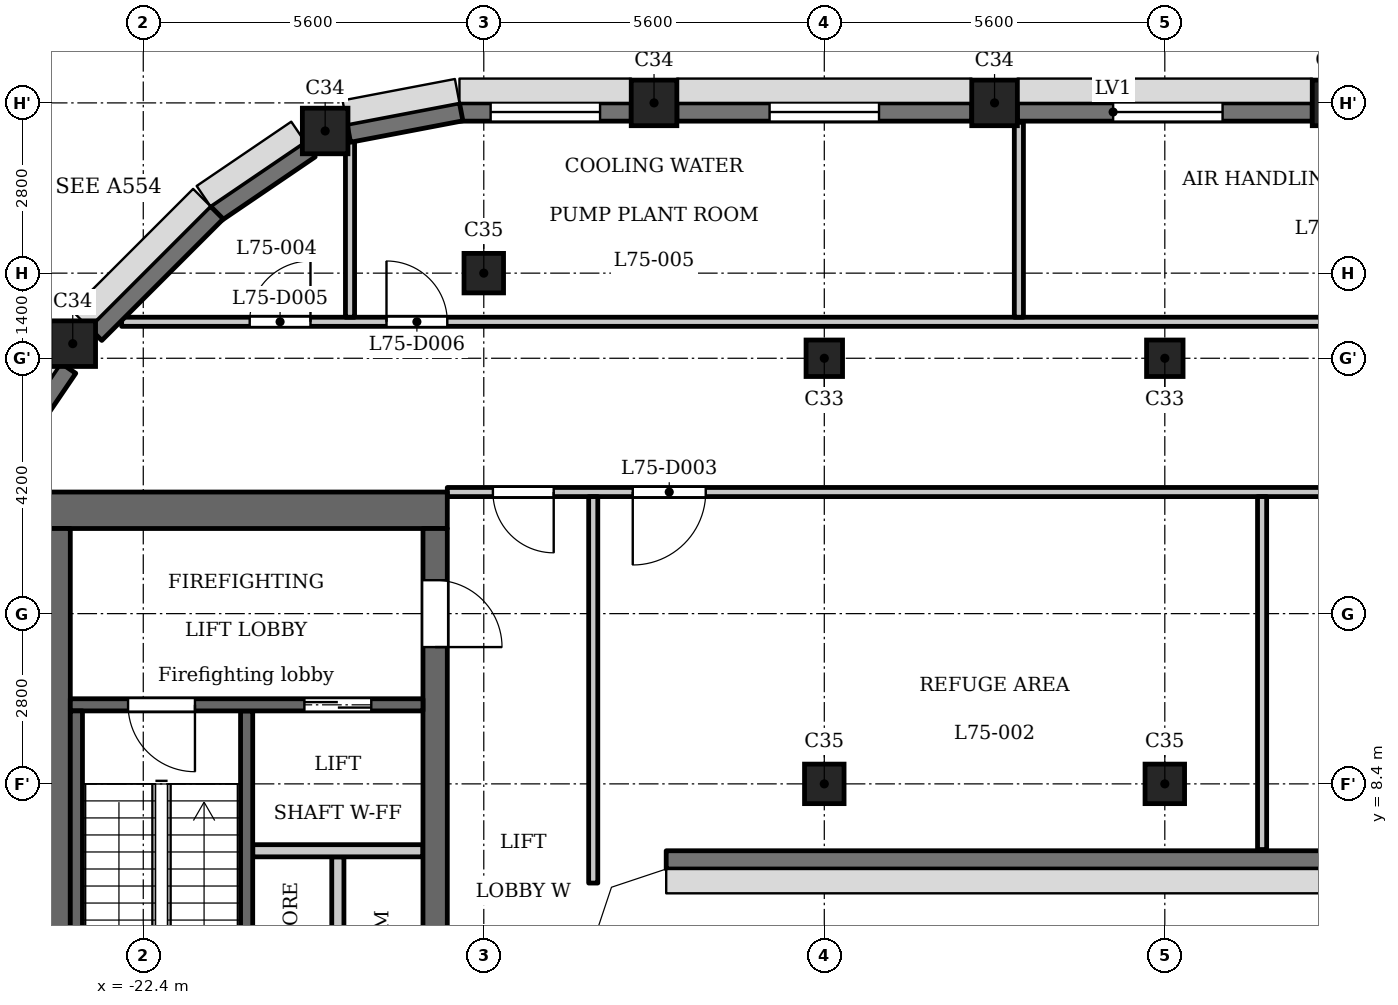
"""IFC4 building model, lengths in metres.
Left out: names, types, materials, properties, quantities, classifications, styles, units other than length and angle.
Written with IfcOpenShell. Run it as: python <this file> out.ifc"""

import sys

from ifc_helpers import new_model, si_unit, direction, frame, frame_2d, origin, origin_2d, place, context, subcontext, project, spatial, polyline, rectangle, outline, extrude, element, fill, save


model = new_model("IFC4")
c1 = context("Model", 3, precision=1e-05, world=origin(), true_north=direction((0.0, 1.0)))
c2 = subcontext(c1, "Body", "Model", "MODEL_VIEW")
j1 = project(units=[si_unit("LENGTHUNIT", "METRE"), si_unit("PLANEANGLEUNIT", "RADIAN")], contexts=[c1])
p1 = place(None, origin())
s1 = spatial("IfcSite", under=j1, at=p1, CompositionType="ELEMENT")
p2 = place(p1, origin())
s2 = spatial("IfcBuilding", under=s1, at=p2, CompositionType="ELEMENT")
p3 = place(p2, frame((0.0, 0.0, 289.1)))
s3 = spatial("IfcBuildingStorey", under=s2, at=p3, CompositionType="ELEMENT", Elevation=289.1)
for number, where, z_axis, x_axis in (
    (1, (-2.8, 19.6, 0.0), (0.0, 0.0, 1.0), (1.0, 0.0, 0.0)),
    (2, (-8.4, 19.6, 0.0), (0.0, 0.0, 1.0), (1.0, 0.0, 0.0)),
    (3, (-14.0, 19.6, 0.0), (0.0, 0.0, 1.0), (1.0, 0.0, 0.0)),
    (4, (-19.409, 19.138, 0.0), (0.0, 0.0, 1.0), (1.0, 0.0, 0.0)),
    (5, (-23.56, 15.64, 0.0), (0.0, 0.0, 1.0), (1.0, 0.0, 0.0)),
):
    element("IfcColumn", number, at=place(p3, frame(where, z_axis=z_axis, x_axis=x_axis)), inside=s3, PredefinedType="COLUMN", context=c2, shape_type="SweptSolid", body=[
        extrude(rectangle(XDim=0.75, YDim=0.75, at=origin_2d()), origin(), (0.0, 0.0, 1.0), 5.4),
    ])
for number, where, z_axis, x_axis in (
    (6, (-16.8, 16.8, 0.0), (0.0, 0.0, 1.0), (1.0, 0.0, 0.0)),
    (7, (-11.2, 8.4, 0.0), (0.0, 0.0, 1.0), (1.0, 0.0, 0.0)),
    (8, (-5.6, 8.4, 0.0), (0.0, 0.0, 1.0), (1.0, 0.0, 0.0)),
):
    element("IfcColumn", number, at=place(p3, frame(where, z_axis=z_axis, x_axis=x_axis)), inside=s3, PredefinedType="COLUMN", context=c2, shape_type="SweptSolid", body=[
        extrude(rectangle(XDim=0.65, YDim=0.65, at=origin_2d()), origin(), (0.0, 0.0, 1.0), 5.4),
    ])
for number, where, z_axis, x_axis in (
    (9, (-11.2, 15.4, 0.0), (0.0, 0.0, 1.0), (1.0, 0.0, 0.0)),
    (10, (-5.6, 15.4, 0.0), (0.0, 0.0, 1.0), (1.0, 0.0, 0.0)),
):
    element("IfcColumn", number, at=place(p3, frame(where, z_axis=z_axis, x_axis=x_axis)), inside=s3, PredefinedType="COLUMN", context=c2, shape_type="SweptSolid", body=[
        extrude(rectangle(XDim=0.6, YDim=0.6, at=origin_2d()), origin(), (0.0, 0.0, 1.0), 5.4),
    ])
p4 = place(p3, frame((-3.175, 19.45, 0.0), z_axis=(0.0, 0.0, 1.0), x_axis=(-1.0, 0.0, 0.0)))
e11 = element("IfcWall", 11, at=p4, inside=s3, PredefinedType="SOLIDWALL", context=c2, shape_type="SweptSolid", body=[
    extrude(rectangle(XDim=4.85, YDim=0.3, at=frame_2d((2.425, 0.0))), origin(), (0.0, 0.0, 1.0), 3.2),
])
p5 = place(p4, frame((1.475, 0.0, 0.9)))
e12 = element("IfcOpeningElement", 12, at=p5, cuts=e11, PredefinedType="OPENING", context=c2, shape_type="SweptSolid", body=[
    extrude(rectangle(XDim=1.8, YDim=1.5, at=frame_2d((0.9, 0.75))), frame((0.0, 0.16, 0.0), z_axis=(0.0, -1.0, 0.0), x_axis=(1.0, 0.0, 0.0)), (0.0, 0.0, 1.0), 0.32),
])
p6 = place(p3, frame((-8.775, 19.45, 0.0), z_axis=(0.0, 0.0, 1.0), x_axis=(-1.0, 0.0, 0.0)))
e13 = element("IfcWall", 13, at=p6, inside=s3, PredefinedType="SOLIDWALL", context=c2, shape_type="SweptSolid", body=[
    extrude(rectangle(XDim=4.85, YDim=0.3, at=frame_2d((2.425, 0.0))), origin(), (0.0, 0.0, 1.0), 3.2),
])
p7 = place(p6, frame((1.525, 0.0, 0.9)))
e14 = element("IfcOpeningElement", 14, at=p7, cuts=e13, PredefinedType="OPENING", context=c2, shape_type="SweptSolid", body=[
    extrude(rectangle(XDim=1.8, YDim=1.5, at=frame_2d((0.9, 0.75))), frame((0.0, 0.16, 0.0), z_axis=(0.0, -1.0, 0.0), x_axis=(1.0, 0.0, 0.0)), (0.0, 0.0, 1.0), 0.32),
])
p8 = place(p3, frame((-14.375, 19.45, 0.0), z_axis=(0.0, 0.0, 1.0), x_axis=(-1.0, 0.0, 0.0)))
e15 = element("IfcWall", 15, at=p8, inside=s3, PredefinedType="SOLIDWALL", context=c2, shape_type="SweptSolid", body=[
    extrude(rectangle(XDim=2.825, YDim=0.3, at=frame_2d((1.413, 0.0))), origin(), (0.0, 0.0, 1.0), 3.2),
])
p9 = place(p8, frame((0.512, 0.0, 0.9)))
e16 = element("IfcOpeningElement", 16, at=p9, cuts=e15, PredefinedType="OPENING", context=c2, shape_type="SweptSolid", body=[
    extrude(rectangle(XDim=1.8, YDim=1.5, at=frame_2d((0.9, 0.75))), frame((0.0, 0.16, 0.0), z_axis=(0.0, -1.0, 0.0), x_axis=(1.0, 0.0, 0.0)), (0.0, 0.0, 1.0), 0.32),
])
p10 = place(p3, frame((-17.172, 19.453, 0.0), z_axis=(0.0, 0.0, 1.0), x_axis=(-0.982284001233, -0.187398348234, 0.0)))
e17 = element("IfcWall", 17, at=p10, inside=s3, PredefinedType="SOLIDWALL", context=c2, shape_type="SweptSolid", body=[
    extrude(rectangle(XDim=1.881, YDim=0.3, at=frame_2d((0.941, 0.0))), origin(), (0.0, 0.0, 1.0), 3.2),
])
p11 = place(p3, frame((-19.657, 18.836, 0.0), z_axis=(0.0, 0.0, 1.0), x_axis=(-0.82704477487, -0.562136051469, 0.0)))
e18 = element("IfcWall", 18, at=p11, inside=s3, PredefinedType="SOLIDWALL", context=c2, shape_type="SweptSolid", body=[
    extrude(rectangle(XDim=1.881, YDim=0.3, at=frame_2d((0.94, 0.0))), origin(), (0.0, 0.0, 1.0), 3.2),
])
p12 = place(p3, frame((-21.191, 17.797, 0.0), z_axis=(0.0, 0.0, 1.0), x_axis=(-0.707106781187, -0.707106781187, 0.0)))
e19 = element("IfcWall", 19, at=p12, inside=s3, PredefinedType="SOLIDWALL", context=c2, shape_type="SweptSolid", body=[
    extrude(rectangle(XDim=2.825, YDim=0.3, at=frame_2d((1.413, 0.0))), origin(), (0.0, 0.0, 1.0), 3.2),
])
p13 = place(p3, frame((-23.634, 15.237, 0.0), z_axis=(0.0, 0.0, 1.0), x_axis=(-0.562099454787, -0.827069648173, 0.0)))
e20 = element("IfcWall", 20, at=p13, inside=s3, PredefinedType="SOLIDWALL", context=c2, shape_type="SweptSolid", body=[
    extrude(rectangle(XDim=1.427, YDim=0.3, at=frame_2d((0.714, 0.0))), origin(), (0.0, 0.0, 1.0), 3.2),
])
p14 = place(p3, frame((-13.8, 7.15, 0.0), z_axis=(0.0, 0.0, 1.0), x_axis=(1.0, 0.0, 0.0)))
e21 = element("IfcWall", 21, at=p14, inside=s3, PredefinedType="SOLIDWALL", context=c2, shape_type="SweptSolid", body=[
    extrude(rectangle(XDim=27.6, YDim=0.3, at=frame_2d((13.8, 0.0))), origin(), (0.0, 0.0, 1.0), 5.0),
])
p15 = place(p3, frame((-20.7, 2.6, 0.0), z_axis=(0.0, 0.0, 1.0), x_axis=(0.0, 1.0, 0.0)))
e22 = element("IfcWall", 22, at=p15, inside=s3, PredefinedType="SHEAR", context=c2, shape_type="SweptSolid", body=[
    extrude(rectangle(XDim=7.0, YDim=0.2, at=frame_2d((3.5, 0.0))), origin(), (0.0, 0.0, 1.0), 5.0),
])
p16 = place(p3, frame((-17.4, 12.9, 0.0), z_axis=(0.0, 0.0, 1.0), x_axis=(-1.0, 0.0, 0.0)))
e23 = element("IfcWall", 23, at=p16, inside=s3, PredefinedType="SHEAR", context=c2, shape_type="SweptSolid", body=[
    extrude(rectangle(XDim=7.32, YDim=0.6, at=frame_2d((3.66, 0.0))), origin(), (0.0, 0.0, 1.0), 5.0),
])
p17 = place(p3, frame((-19.2, 2.6, 0.0), z_axis=(0.0, 0.0, 1.0), x_axis=(0.0, 1.0, 0.0)))
e24 = element("IfcWall", 24, at=p17, inside=s3, PredefinedType="PARTITIONING", context=c2, shape_type="SweptSolid", body=[
    extrude(rectangle(XDim=4.6, YDim=0.2, at=frame_2d((2.3, 0.0))), origin(), (0.0, 0.0, 1.0), 5.0),
])
p18 = place(p3, frame((-17.6, -12.6, 0.0), z_axis=(0.0, 0.0, 1.0), x_axis=(0.0, 1.0, 0.0)))
e25 = element("IfcWall", 25, at=p18, inside=s3, PredefinedType="SHEAR", context=c2, shape_type="SweptSolid", body=[
    extrude(rectangle(XDim=25.2, YDim=0.4, at=frame_2d((12.6, 0.0))), origin(), (0.0, 0.0, 1.0), 5.0),
])
p19 = place(p18, frame((6.3, 0.0, 0.0)))
e26 = element("IfcOpeningElement", 26, at=p19, cuts=e25, PredefinedType="OPENING", context=c2, shape_type="SweptSolid", body=[
    extrude(rectangle(XDim=1.1, YDim=2.1, at=frame_2d((0.55, 1.05))), frame((0.0, 0.21, 0.0), z_axis=(0.0, -1.0, 0.0), x_axis=(1.0, 0.0, 0.0)), (0.0, 0.0, 1.0), 0.42),
])
p20 = place(p18, frame((8.7, 0.0, 0.0)))
e27 = element("IfcOpeningElement", 27, at=p20, cuts=e25, PredefinedType="OPENING", context=c2, shape_type="SweptSolid", body=[
    extrude(rectangle(XDim=1.1, YDim=2.1, at=frame_2d((0.55, 1.05))), frame((0.0, 0.21, 0.0), z_axis=(0.0, -1.0, 0.0), x_axis=(1.0, 0.0, 0.0)), (0.0, 0.0, 1.0), 0.42),
])
p21 = place(p18, frame((11.2, 0.0, 0.0)))
e28 = element("IfcOpeningElement", 28, at=p21, cuts=e25, PredefinedType="OPENING", context=c2, shape_type="SweptSolid", body=[
    extrude(rectangle(XDim=0.9, YDim=2.1, at=frame_2d((0.45, 1.05))), frame((0.0, 0.21, 0.0), z_axis=(0.0, -1.0, 0.0), x_axis=(1.0, 0.0, 0.0)), (0.0, 0.0, 1.0), 0.42),
])
p22 = place(p18, frame((17.05, 0.0, 0.0)))
e29 = element("IfcOpeningElement", 29, at=p22, cuts=e25, PredefinedType="OPENING", context=c2, shape_type="SweptSolid", body=[
    extrude(rectangle(XDim=0.9, YDim=2.1, at=frame_2d((0.45, 1.05))), frame((0.0, 0.21, 0.0), z_axis=(0.0, -1.0, 0.0), x_axis=(1.0, 0.0, 0.0)), (0.0, 0.0, 1.0), 0.42),
])
p23 = place(p18, frame((23.25, 0.0, 0.0)))
e30 = element("IfcOpeningElement", 30, at=p23, cuts=e25, PredefinedType="OPENING", context=c2, shape_type="SweptSolid", body=[
    extrude(rectangle(XDim=1.1, YDim=2.1, at=frame_2d((0.55, 1.05))), frame((0.0, 0.21, 0.0), z_axis=(0.0, -1.0, 0.0), x_axis=(1.0, 0.0, 0.0)), (0.0, 0.0, 1.0), 0.42),
])
p24 = place(p18, frame((0.85, 0.0, 0.0)))
e31 = element("IfcOpeningElement", 31, at=p24, cuts=e25, PredefinedType="OPENING", context=c2, shape_type="SweptSolid", body=[
    extrude(rectangle(XDim=1.1, YDim=2.1, at=frame_2d((0.55, 1.05))), frame((0.0, 0.21, 0.0), z_axis=(0.0, -1.0, 0.0), x_axis=(1.0, 0.0, 0.0)), (0.0, 0.0, 1.0), 0.42),
])
p25 = place(p18, frame((13.075, 0.0, 0.0)))
e32 = element("IfcOpeningElement", 32, at=p25, cuts=e25, PredefinedType="OPENING", context=c2, shape_type="SweptSolid", body=[
    extrude(rectangle(XDim=1.8, YDim=2.1, at=frame_2d((0.9, 1.05))), frame((0.0, 0.21, 0.0), z_axis=(0.0, -1.0, 0.0), x_axis=(1.0, 0.0, 0.0)), (0.0, 0.0, 1.0), 0.42),
])
p26 = place(p3, frame((-23.9, -12.6, 0.0), z_axis=(0.0, 0.0, 1.0), x_axis=(0.0, 1.0, 0.0)))
e33 = element("IfcWall", 33, at=p26, inside=s3, PredefinedType="SHEAR", context=c2, shape_type="SweptSolid", body=[
    extrude(rectangle(XDim=25.2, YDim=0.6, at=frame_2d((12.6, 0.0))), origin(), (0.0, 0.0, 1.0), 5.0),
])
p27 = place(p3, frame((-17.8, 7.3, 0.0), z_axis=(0.0, 0.0, 1.0), x_axis=(-1.0, 0.0, 0.0)))
e34 = element("IfcWall", 34, at=p27, inside=s3, PredefinedType="PARTITIONING", context=c2, shape_type="SweptSolid", body=[
    extrude(rectangle(XDim=2.8, YDim=0.2, at=frame_2d((1.4, 0.0))), origin(), (0.0, 0.0, 1.0), 5.0),
])
p28 = place(p3, frame((-17.8, 9.7, 0.0), z_axis=(0.0, 0.0, 1.0), x_axis=(-1.0, 0.0, 0.0)))
e35 = element("IfcWall", 35, at=p28, inside=s3, PredefinedType="SHEAR", context=c2, shape_type="SweptSolid", body=[
    extrude(rectangle(XDim=5.8, YDim=0.2, at=frame_2d((2.9, 0.0))), origin(), (0.0, 0.0, 1.0), 5.0),
])
p29 = place(p28, frame((0.85, 0.0, 0.0)))
e36 = element("IfcOpeningElement", 36, at=p29, cuts=e35, PredefinedType="OPENING", context=c2, shape_type="SweptSolid", body=[
    extrude(rectangle(XDim=1.1, YDim=2.1, at=frame_2d((0.55, 1.05))), frame((0.0, 0.11, 0.0), z_axis=(0.0, -1.0, 0.0), x_axis=(1.0, 0.0, 0.0)), (0.0, 0.0, 1.0), 0.22),
])
p30 = place(p28, frame((3.75, 0.0, 0.0)))
e37 = element("IfcOpeningElement", 37, at=p30, cuts=e35, PredefinedType="OPENING", context=c2, shape_type="SweptSolid", body=[
    extrude(rectangle(XDim=1.1, YDim=2.1, at=frame_2d((0.55, 1.05))), frame((0.0, 0.11, 0.0), z_axis=(0.0, -1.0, 0.0), x_axis=(1.0, 0.0, 0.0)), (0.0, 0.0, 1.0), 0.22),
])
p31 = place(p3, frame((-23.5, 2.6, 0.0), z_axis=(0.0, 0.0, 1.0), x_axis=(0.0, 1.0, 0.0)))
e38 = element("IfcWall", 38, at=p31, inside=s3, PredefinedType="SHEAR", context=c2, shape_type="SweptSolid", body=[
    extrude(rectangle(XDim=7.0, YDim=0.2, at=frame_2d((3.5, 0.0))), origin(), (0.0, 0.0, 1.0), 5.0),
])
p32 = place(p3, frame((-17.4, 13.2, 0.0), z_axis=(0.0, 0.0, 1.0), x_axis=(1.0, 0.0, 0.0)))
e39 = element("IfcWall", 39, at=p32, inside=s3, PredefinedType="PARTITIONING", context=c2, shape_type="SweptSolid", body=[
    extrude(rectangle(XDim=34.8, YDim=0.15, at=frame_2d((17.4, 0.0))), origin(), (0.0, 0.0, 1.0), 5.0),
])
p33 = place(p32, frame((0.75, 0.0, 0.0)))
e40 = element("IfcOpeningElement", 40, at=p33, cuts=e39, PredefinedType="OPENING", context=c2, shape_type="SweptSolid", body=[
    extrude(rectangle(XDim=1.0, YDim=2.1, at=frame_2d((0.5, 1.05))), frame((0.0, 0.085, 0.0), z_axis=(0.0, -1.0, 0.0), x_axis=(1.0, 0.0, 0.0)), (0.0, 0.0, 1.0), 0.17),
])
p34 = place(p32, frame((33.15, 0.0, 0.0)))
e41 = element("IfcOpeningElement", 41, at=p34, cuts=e39, PredefinedType="OPENING", context=c2, shape_type="SweptSolid", body=[
    extrude(rectangle(XDim=1.0, YDim=2.1, at=frame_2d((0.5, 1.05))), frame((0.0, 0.085, 0.0), z_axis=(0.0, -1.0, 0.0), x_axis=(1.0, 0.0, 0.0)), (0.0, 0.0, 1.0), 0.17),
])
p35 = place(p32, frame((3.05, 0.0, 0.0)))
e42 = element("IfcOpeningElement", 42, at=p35, cuts=e39, PredefinedType="OPENING", context=c2, shape_type="SweptSolid", body=[
    extrude(rectangle(XDim=1.2, YDim=2.1, at=frame_2d((0.6, 1.05))), frame((0.0, 0.085, 0.0), z_axis=(0.0, -1.0, 0.0), x_axis=(1.0, 0.0, 0.0)), (0.0, 0.0, 1.0), 0.17),
])
p36 = place(p32, frame((30.8, 0.0, 0.0)))
e43 = element("IfcOpeningElement", 43, at=p36, cuts=e39, PredefinedType="OPENING", context=c2, shape_type="SweptSolid", body=[
    extrude(rectangle(XDim=1.0, YDim=2.1, at=frame_2d((0.5, 1.05))), frame((0.0, 0.085, 0.0), z_axis=(0.0, -1.0, 0.0), x_axis=(1.0, 0.0, 0.0)), (0.0, 0.0, 1.0), 0.17),
])
p37 = place(p3, frame((-22.756, 16.0, 0.0), z_axis=(0.0, 0.0, 1.0), x_axis=(1.0, 0.0, 0.0)))
e44 = element("IfcWall", 44, at=p37, inside=s3, PredefinedType="PARTITIONING", context=c2, shape_type="SweptSolid", body=[
    extrude(rectangle(XDim=45.511, YDim=0.15, at=frame_2d((22.756, 0.0))), origin(), (0.0, 0.0, 1.0), 5.0),
])
p38 = place(p37, frame((2.106, 0.0, 0.0)))
e45 = element("IfcOpeningElement", 45, at=p38, cuts=e44, PredefinedType="OPENING", context=c2, shape_type="SweptSolid", body=[
    extrude(rectangle(XDim=1.0, YDim=2.1, at=frame_2d((0.5, 1.05))), frame((0.0, 0.085, 0.0), z_axis=(0.0, -1.0, 0.0), x_axis=(1.0, 0.0, 0.0)), (0.0, 0.0, 1.0), 0.17),
])
p39 = place(p37, frame((4.356, 0.0, 0.0)))
e46 = element("IfcOpeningElement", 46, at=p39, cuts=e44, PredefinedType="OPENING", context=c2, shape_type="SweptSolid", body=[
    extrude(rectangle(XDim=1.0, YDim=2.1, at=frame_2d((0.5, 1.05))), frame((0.0, 0.085, 0.0), z_axis=(0.0, -1.0, 0.0), x_axis=(1.0, 0.0, 0.0)), (0.0, 0.0, 1.0), 0.17),
])
p40 = place(p37, frame((25.106, 0.0, 0.0)))
e47 = element("IfcOpeningElement", 47, at=p40, cuts=e44, PredefinedType="OPENING", context=c2, shape_type="SweptSolid", body=[
    extrude(rectangle(XDim=1.0, YDim=2.1, at=frame_2d((0.5, 1.05))), frame((0.0, 0.085, 0.0), z_axis=(0.0, -1.0, 0.0), x_axis=(1.0, 0.0, 0.0)), (0.0, 0.0, 1.0), 0.17),
])
p41 = place(p37, frame((26.929, 0.0, 0.0)))
e48 = element("IfcOpeningElement", 48, at=p41, cuts=e44, PredefinedType="OPENING", context=c2, shape_type="SweptSolid", body=[
    extrude(rectangle(XDim=1.0, YDim=2.1, at=frame_2d((0.5, 1.05))), frame((0.0, 0.085, 0.0), z_axis=(0.0, -1.0, 0.0), x_axis=(1.0, 0.0, 0.0)), (0.0, 0.0, 1.0), 0.17),
])
p42 = place(p3, frame((-19.0, 16.075, 0.0), z_axis=(0.0, 0.0, 1.0), x_axis=(0.0, 1.0, 0.0)))
e49 = element("IfcWall", 49, at=p42, inside=s3, PredefinedType="PARTITIONING", context=c2, shape_type="SweptSolid", body=[
    extrude(rectangle(XDim=2.902, YDim=0.15, at=frame_2d((1.451, 0.0))), origin(), (0.0, 0.0, 1.0), 5.0),
])
p43 = place(p3, frame((-15.0, 6.769, 0.0), z_axis=(0.0, 0.0, 1.0), x_axis=(0.0, 1.0, 0.0)))
e50 = element("IfcWall", 50, at=p43, inside=s3, PredefinedType="PARTITIONING", context=c2, shape_type="SweptSolid", body=[
    extrude(rectangle(XDim=6.356, YDim=0.15, at=frame_2d((3.178, 0.0))), origin(), (0.0, 0.0, 1.0), 5.0),
])
p44 = place(p3, frame((-8.0, 16.075, 0.0), z_axis=(0.0, 0.0, 1.0), x_axis=(0.0, 1.0, 0.0)))
e51 = element("IfcWall", 51, at=p44, inside=s3, PredefinedType="PARTITIONING", context=c2, shape_type="SweptSolid", body=[
    extrude(rectangle(XDim=3.205, YDim=0.15, at=frame_2d((1.603, 0.0))), origin(), (0.0, 0.0, 1.0), 5.0),
])
p45 = place(p3, frame((-4.0, 7.32, 0.0), z_axis=(0.0, 0.0, 1.0), x_axis=(0.0, 1.0, 0.0)))
e52 = element("IfcWall", 52, at=p45, inside=s3, PredefinedType="PARTITIONING", context=c2, shape_type="SweptSolid", body=[
    extrude(rectangle(XDim=5.805, YDim=0.15, at=frame_2d((2.902, 0.0))), origin(), (0.0, 0.0, 1.0), 5.0),
])
p46 = place(p3, origin())
e53 = element("IfcWall", 53, at=p46, inside=s3, PredefinedType="SOLIDWALL", context=c2, shape_type="SweptSolid", body=[
    extrude(outline(polyline([(-13.849, 7.3), (-14.937, 6.937), (-15.3, 5.849), (-15.3, 5.8), (-15.0, 5.8), (-14.7, 6.7), (-13.8, 7.0), (-13.8, 7.3), (-13.849, 7.3)])), origin(), (0.0, 0.0, 1.0), 5.0),
])
p47 = place(p29, origin())
e54 = element("IfcDoor", 54, at=p47, inside=s3, OperationType="DOUBLE_DOOR_SLIDING", PredefinedType="DOOR", context=c2, shape_type="SweptSolid", body=[
    extrude(rectangle(XDim=1.1, YDim=2.1, at=frame_2d((0.55, 1.05))), frame((0.0, 0.025, 0.0), z_axis=(0.0, -1.0, 0.0), x_axis=(1.0, 0.0, 0.0)), (0.0, 0.0, 1.0), 0.05),
])
fill(e36, e54)
p48 = place(p23, origin())
e55 = element("IfcDoor", 55, at=p48, inside=s3, OperationType="SINGLE_SWING_LEFT", PredefinedType="DOOR", context=c2, shape_type="SweptSolid", body=[
    extrude(rectangle(XDim=1.1, YDim=2.1, at=frame_2d((0.55, 1.05))), frame((0.0, 0.025, 0.0), z_axis=(0.0, -1.0, 0.0), x_axis=(1.0, 0.0, 0.0)), (0.0, 0.0, 1.0), 0.05),
])
fill(e30, e55)
p49 = place(p30, origin())
e56 = element("IfcDoor", 56, at=p49, inside=s3, OperationType="SINGLE_SWING_RIGHT", PredefinedType="DOOR", context=c2, shape_type="SweptSolid", body=[
    extrude(rectangle(XDim=1.1, YDim=2.1, at=frame_2d((0.55, 1.05))), frame((0.0, 0.025, 0.0), z_axis=(0.0, -1.0, 0.0), x_axis=(1.0, 0.0, 0.0)), (0.0, 0.0, 1.0), 0.05),
])
fill(e37, e56)
p50 = place(p33, origin())
e57 = element("IfcDoor", 57, at=p50, inside=s3, OperationType="SINGLE_SWING_RIGHT", PredefinedType="DOOR", context=c2, shape_type="SweptSolid", body=[
    extrude(rectangle(XDim=1.0, YDim=2.1, at=frame_2d((0.5, 1.05))), frame((0.0, 0.025, 0.0), z_axis=(0.0, -1.0, 0.0), x_axis=(1.0, 0.0, 0.0)), (0.0, 0.0, 1.0), 0.05),
])
fill(e40, e57)
p51 = place(p35, origin())
e58 = element("IfcDoor", 58, at=p51, inside=s3, OperationType="SINGLE_SWING_LEFT", PredefinedType="DOOR", context=c2, shape_type="SweptSolid", body=[
    extrude(rectangle(XDim=1.2, YDim=2.1, at=frame_2d((0.6, 1.05))), frame((0.0, 0.025, 0.0), z_axis=(0.0, -1.0, 0.0), x_axis=(1.0, 0.0, 0.0)), (0.0, 0.0, 1.0), 0.05),
])
fill(e42, e58)
p52 = place(p38, origin())
e59 = element("IfcDoor", 59, at=p52, inside=s3, OperationType="SINGLE_SWING_LEFT", PredefinedType="DOOR", context=c2, shape_type="SweptSolid", body=[
    extrude(rectangle(XDim=1.0, YDim=2.1, at=frame_2d((0.5, 1.05))), frame((0.0, 0.025, 0.0), z_axis=(0.0, -1.0, 0.0), x_axis=(1.0, 0.0, 0.0)), (0.0, 0.0, 1.0), 0.05),
])
fill(e45, e59)
p53 = place(p39, origin())
e60 = element("IfcDoor", 60, at=p53, inside=s3, OperationType="SINGLE_SWING_RIGHT", PredefinedType="DOOR", context=c2, shape_type="SweptSolid", body=[
    extrude(rectangle(XDim=1.0, YDim=2.1, at=frame_2d((0.5, 1.05))), frame((0.0, 0.025, 0.0), z_axis=(0.0, -1.0, 0.0), x_axis=(1.0, 0.0, 0.0)), (0.0, 0.0, 1.0), 0.05),
])
fill(e46, e60)
p54 = place(p5, origin())
e61 = element("IfcWindow", 61, at=p54, inside=s3, PartitioningType="SINGLE_PANEL", PredefinedType="WINDOW", context=c2, shape_type="SweptSolid", body=[
    extrude(rectangle(XDim=1.8, YDim=1.5, at=frame_2d((0.9, 0.75))), frame((0.0, 0.03, 0.0), z_axis=(0.0, -1.0, 0.0), x_axis=(1.0, 0.0, 0.0)), (0.0, 0.0, 1.0), 0.06),
])
fill(e12, e61)
p55 = place(p7, origin())
e62 = element("IfcWindow", 62, at=p55, inside=s3, PartitioningType="SINGLE_PANEL", PredefinedType="WINDOW", context=c2, shape_type="SweptSolid", body=[
    extrude(rectangle(XDim=1.8, YDim=1.5, at=frame_2d((0.9, 0.75))), frame((0.0, 0.03, 0.0), z_axis=(0.0, -1.0, 0.0), x_axis=(1.0, 0.0, 0.0)), (0.0, 0.0, 1.0), 0.06),
])
fill(e14, e62)
p56 = place(p9, origin())
e63 = element("IfcWindow", 63, at=p56, inside=s3, PartitioningType="SINGLE_PANEL", PredefinedType="WINDOW", context=c2, shape_type="SweptSolid", body=[
    extrude(rectangle(XDim=1.8, YDim=1.5, at=frame_2d((0.9, 0.75))), frame((0.0, 0.03, 0.0), z_axis=(0.0, -1.0, 0.0), x_axis=(1.0, 0.0, 0.0)), (0.0, 0.0, 1.0), 0.06),
])
fill(e16, e63)
save(model, sys.argv[1])
